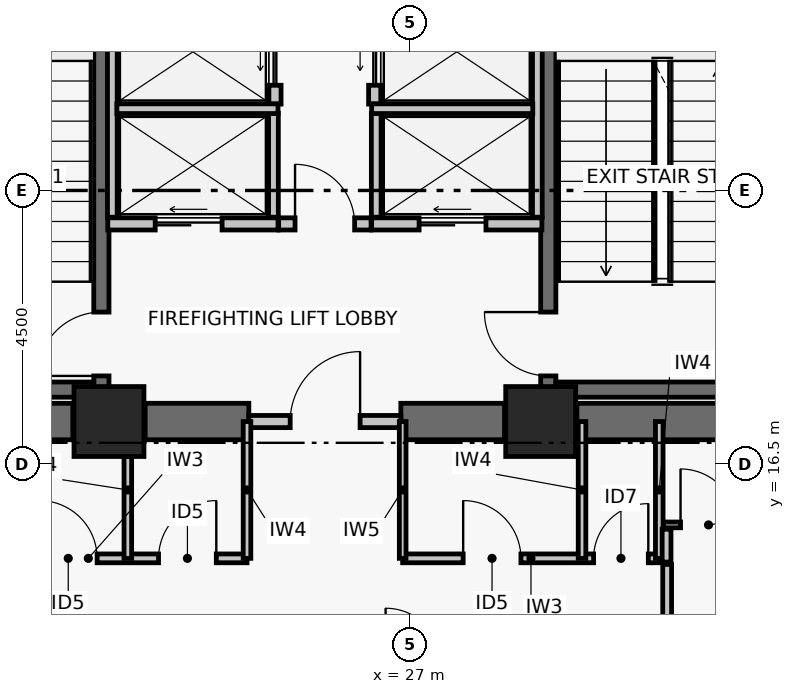
"""IFC4 building model, lengths in metres.
Left out: names, types, materials, properties, quantities, classifications, styles, units other than length and angle.
Written with IfcOpenShell. Run it as: python <this file> out.ifc"""

import sys

from ifc_helpers import new_model, si_unit, direction, frame, frame_2d, origin, origin_2d, place, context, subcontext, project, spatial, rectangle, extrude, element, fill, save


model = new_model("IFC4")
c1 = context("Model", 3, precision=1e-05, world=origin(), true_north=direction((0.0, 1.0)))
c2 = subcontext(c1, "Body", "Model", "MODEL_VIEW")
j1 = project(units=[si_unit("LENGTHUNIT", "METRE"), si_unit("PLANEANGLEUNIT", "RADIAN")], contexts=[c1])
p1 = place(None, origin())
s1 = spatial("IfcSite", under=j1, at=p1, CompositionType="ELEMENT")
p2 = place(p1, origin())
s2 = spatial("IfcBuilding", under=s1, at=p2, CompositionType="ELEMENT")
p3 = place(p2, frame((0.0, 0.0, 75.96)))
s3 = spatial("IfcBuildingStorey", under=s2, at=p3, CompositionType="ELEMENT", Elevation=75.96)
for number, where, z_axis, x_axis in (
    (1, (22.05, 17.2, 0.0), (0.0, 0.0, 1.0), (1.0, 0.0, 0.0)),
    (2, (29.15, 17.2, 0.0), (0.0, 0.0, 1.0), (1.0, 0.0, 0.0)),
):
    element("IfcColumn", number, at=place(p3, frame(where, z_axis=z_axis, x_axis=x_axis)), inside=s3, PredefinedType="COLUMN", context=c2, shape_type="SweptSolid", body=[
        extrude(rectangle(XDim=1.15, YDim=1.15, at=origin_2d()), origin(), (0.0, 0.0, 1.0), 3.72),
    ])
p4 = place(p3, frame((18.395, 17.2, 0.0), z_axis=(0.0, 0.0, 1.0), x_axis=(1.0, 0.0, 0.0)))
e3 = element("IfcWall", 3, at=p4, inside=s3, PredefinedType="SHEAR", context=c2, shape_type="SweptSolid", body=[
    extrude(rectangle(XDim=3.06, YDim=0.6, at=frame_2d((1.53, 0.0))), origin(), (0.0, 0.0, 1.0), 3.47),
])
p5 = place(p3, frame((22.645, 17.2, 0.0), z_axis=(0.0, 0.0, 1.0), x_axis=(1.0, 0.0, 0.0)))
e4 = element("IfcWall", 4, at=p5, inside=s3, PredefinedType="SHEAR", context=c2, shape_type="SweptSolid", body=[
    extrude(rectangle(XDim=1.705, YDim=0.6, at=frame_2d((0.853, 0.0))), origin(), (0.0, 0.0, 1.0), 3.47),
])
p6 = place(p3, frame((26.85, 17.2, 0.0), z_axis=(0.0, 0.0, 1.0), x_axis=(1.0, 0.0, 0.0)))
e5 = element("IfcWall", 5, at=p6, inside=s3, PredefinedType="SHEAR", context=c2, shape_type="SweptSolid", body=[
    extrude(rectangle(XDim=1.705, YDim=0.6, at=frame_2d((0.853, 0.0))), origin(), (0.0, 0.0, 1.0), 3.47),
])
p7 = place(p3, frame((29.745, 17.2, 0.0), z_axis=(0.0, 0.0, 1.0), x_axis=(1.0, 0.0, 0.0)))
e6 = element("IfcWall", 6, at=p7, inside=s3, PredefinedType="SHEAR", context=c2, shape_type="SweptSolid", body=[
    extrude(rectangle(XDim=3.06, YDim=0.6, at=frame_2d((1.53, 0.0))), origin(), (0.0, 0.0, 1.0), 3.47),
])
p8 = place(p3, frame((21.925, 17.6, 0.0), z_axis=(0.0, 0.0, 1.0), x_axis=(0.0, 1.0, 0.0)))
e7 = element("IfcWall", 7, at=p8, inside=s3, PredefinedType="SHEAR", context=c2, shape_type="SweptSolid", body=[
    extrude(rectangle(XDim=8.8, YDim=0.25, at=frame_2d((4.4, 0.0))), origin(), (0.0, 0.0, 1.0), 3.47),
])
p9 = place(p8, frame((0.35, 0.0, 0.0)))
e8 = element("IfcOpeningElement", 8, at=p9, cuts=e7, PredefinedType="OPENING", context=c2, shape_type="SweptSolid", body=[
    extrude(rectangle(XDim=1.05, YDim=2.08, at=frame_2d((0.525, 1.04))), frame((0.0, 0.135, 0.0), z_axis=(0.0, -1.0, 0.0), x_axis=(1.0, 0.0, 0.0)), (0.0, 0.0, 1.0), 0.27),
])
p10 = place(p3, frame((18.354, 17.725, 0.0), z_axis=(0.0, 0.0, 1.0), x_axis=(1.0, 0.0, 0.0)))
e9 = element("IfcWall", 9, at=p10, inside=s3, PredefinedType="SHEAR", context=c2, shape_type="SweptSolid", body=[
    extrude(rectangle(XDim=3.446, YDim=0.25, at=frame_2d((1.723, 0.0))), origin(), (0.0, 0.0, 1.0), 3.47),
])
p11 = place(p3, frame((29.275, 17.6, 0.0), z_axis=(0.0, 0.0, 1.0), x_axis=(0.0, 1.0, 0.0)))
e10 = element("IfcWall", 10, at=p11, inside=s3, PredefinedType="SHEAR", context=c2, shape_type="SweptSolid", body=[
    extrude(rectangle(XDim=8.8, YDim=0.25, at=frame_2d((4.4, 0.0))), origin(), (0.0, 0.0, 1.0), 3.47),
])
p12 = place(p11, frame((0.35, 0.0, 0.0)))
e11 = element("IfcOpeningElement", 11, at=p12, cuts=e10, PredefinedType="OPENING", context=c2, shape_type="SweptSolid", body=[
    extrude(rectangle(XDim=1.05, YDim=2.08, at=frame_2d((0.525, 1.04))), frame((0.0, 0.135, 0.0), z_axis=(0.0, -1.0, 0.0), x_axis=(1.0, 0.0, 0.0)), (0.0, 0.0, 1.0), 0.27),
])
p13 = place(p3, frame((29.4, 17.725, 0.0), z_axis=(0.0, 0.0, 1.0), x_axis=(1.0, 0.0, 0.0)))
e12 = element("IfcWall", 12, at=p13, inside=s3, PredefinedType="SHEAR", context=c2, shape_type="SweptSolid", body=[
    extrude(rectangle(XDim=3.446, YDim=0.25, at=frame_2d((1.723, 0.0))), origin(), (0.0, 0.0, 1.0), 3.47),
])
p14 = place(p3, frame((24.35, 17.2, 0.0), z_axis=(0.0, 0.0, 1.0), x_axis=(1.0, 0.0, 0.0)))
e13 = element("IfcWall", 13, at=p14, inside=s3, PredefinedType="PARTITIONING", context=c2, shape_type="SweptSolid", body=[
    extrude(rectangle(XDim=2.5, YDim=0.2, at=frame_2d((1.25, 0.0))), origin(), (0.0, 0.0, 1.0), 2.6),
])
p15 = place(p14, frame((0.68, 0.0, 0.0)))
e14 = element("IfcOpeningElement", 14, at=p15, cuts=e13, PredefinedType="OPENING", context=c2, shape_type="SweptSolid", body=[
    extrude(rectangle(XDim=1.15, YDim=2.08, at=frame_2d((0.575, 1.04))), frame((0.0, 0.11, 0.0), z_axis=(0.0, -1.0, 0.0), x_axis=(1.0, 0.0, 0.0)), (0.0, 0.0, 1.0), 0.22),
])
p16 = place(p3, frame((24.84, 20.45, 0.0), z_axis=(0.0, 0.0, 1.0), x_axis=(1.0, 0.0, 0.0)))
e15 = element("IfcWall", 15, at=p16, inside=s3, PredefinedType="PARTITIONING", context=c2, shape_type="SweptSolid", body=[
    extrude(rectangle(XDim=1.52, YDim=0.2, at=frame_2d((0.76, 0.0))), origin(), (0.0, 0.0, 1.0), 3.47),
])
p17 = place(p16, frame((0.27, 0.0, 0.0)))
e16 = element("IfcOpeningElement", 16, at=p17, cuts=e15, PredefinedType="OPENING", context=c2, shape_type="SweptSolid", body=[
    extrude(rectangle(XDim=0.98, YDim=2.06, at=frame_2d((0.49, 1.03))), frame((0.0, 0.11, 0.0), z_axis=(0.0, -1.0, 0.0), x_axis=(1.0, 0.0, 0.0)), (0.0, 0.0, 1.0), 0.22),
])
p18 = place(p3, frame((22.03, 20.45, 0.0), z_axis=(0.0, 0.0, 1.0), x_axis=(1.0, 0.0, 0.0)))
e17 = element("IfcWall", 17, at=p18, inside=s3, PredefinedType="PARTITIONING", context=c2, shape_type="SweptSolid", body=[
    extrude(rectangle(XDim=2.8, YDim=0.2, at=frame_2d((1.4, 0.0))), origin(), (0.0, 0.0, 1.0), 3.47),
])
p19 = place(p18, frame((0.78, 0.0, 0.0)))
e18 = element("IfcOpeningElement", 18, at=p19, cuts=e17, PredefinedType="OPENING", context=c2, shape_type="SweptSolid", body=[
    extrude(rectangle(XDim=1.1, YDim=2.08, at=frame_2d((0.55, 1.04))), frame((0.0, 0.11, 0.0), z_axis=(0.0, -1.0, 0.0), x_axis=(1.0, 0.0, 0.0)), (0.0, 0.0, 1.0), 0.22),
])
p20 = place(p3, frame((26.37, 20.45, 0.0), z_axis=(0.0, 0.0, 1.0), x_axis=(1.0, 0.0, 0.0)))
e19 = element("IfcWall", 19, at=p20, inside=s3, PredefinedType="PARTITIONING", context=c2, shape_type="SweptSolid", body=[
    extrude(rectangle(XDim=2.8, YDim=0.2, at=frame_2d((1.4, 0.0))), origin(), (0.0, 0.0, 1.0), 3.47),
])
p21 = place(p20, frame((0.78, 0.0, 0.0)))
e20 = element("IfcOpeningElement", 20, at=p21, cuts=e19, PredefinedType="OPENING", context=c2, shape_type="SweptSolid", body=[
    extrude(rectangle(XDim=1.1, YDim=2.08, at=frame_2d((0.55, 1.04))), frame((0.0, 0.11, 0.0), z_axis=(0.0, -1.0, 0.0), x_axis=(1.0, 0.0, 0.0)), (0.0, 0.0, 1.0), 0.22),
])
p22 = place(p3, frame((24.78, 22.42, 0.0), z_axis=(0.0, 0.0, 1.0), x_axis=(0.0, 1.0, 0.0)))
e21 = element("IfcWall", 21, at=p22, inside=s3, PredefinedType="PARTITIONING", context=c2, shape_type="SweptSolid", body=[
    extrude(rectangle(XDim=1.72, YDim=0.2, at=frame_2d((0.86, 0.0))), origin(), (0.0, 0.0, 1.0), 3.47),
])
p23 = place(p22, frame((0.31, 0.0, 0.0)))
e22 = element("IfcOpeningElement", 22, at=p23, cuts=e21, PredefinedType="OPENING", context=c2, shape_type="SweptSolid", body=[
    extrude(rectangle(XDim=1.1, YDim=2.08, at=frame_2d((0.55, 1.04))), frame((0.0, 0.11, 0.0), z_axis=(0.0, -1.0, 0.0), x_axis=(1.0, 0.0, 0.0)), (0.0, 0.0, 1.0), 0.22),
])
p24 = place(p3, frame((26.42, 22.42, 0.0), z_axis=(0.0, 0.0, 1.0), x_axis=(0.0, 1.0, 0.0)))
e23 = element("IfcWall", 23, at=p24, inside=s3, PredefinedType="PARTITIONING", context=c2, shape_type="SweptSolid", body=[
    extrude(rectangle(XDim=1.72, YDim=0.2, at=frame_2d((0.86, 0.0))), origin(), (0.0, 0.0, 1.0), 3.47),
])
p25 = place(p24, frame((0.31, 0.0, 0.0)))
e24 = element("IfcOpeningElement", 24, at=p25, cuts=e23, PredefinedType="OPENING", context=c2, shape_type="SweptSolid", body=[
    extrude(rectangle(XDim=1.1, YDim=2.08, at=frame_2d((0.55, 1.04))), frame((0.0, 0.11, 0.0), z_axis=(0.0, -1.0, 0.0), x_axis=(1.0, 0.0, 0.0)), (0.0, 0.0, 1.0), 0.22),
])
p26 = place(p3, frame((22.105, 20.56, 0.0), z_axis=(0.0, 0.0, 1.0), x_axis=(0.0, 1.0, 0.0)))
e25 = element("IfcWall", 25, at=p26, inside=s3, PredefinedType="PARTITIONING", context=c2, shape_type="SweptSolid", body=[
    extrude(rectangle(XDim=5.45, YDim=0.16, at=frame_2d((2.725, 0.0))), origin(), (0.0, 0.0, 1.0), 3.47),
])
p27 = place(p3, frame((24.755, 20.56, 0.0), z_axis=(0.0, 0.0, 1.0), x_axis=(0.0, 1.0, 0.0)))
e26 = element("IfcWall", 26, at=p27, inside=s3, PredefinedType="PARTITIONING", context=c2, shape_type="SweptSolid", body=[
    extrude(rectangle(XDim=1.71, YDim=0.16, at=frame_2d((0.855, 0.0))), origin(), (0.0, 0.0, 1.0), 3.47),
])
p28 = place(p3, frame((22.18, 22.345, 0.0), z_axis=(0.0, 0.0, 1.0), x_axis=(1.0, 0.0, 0.0)))
e27 = element("IfcWall", 27, at=p28, inside=s3, PredefinedType="PARTITIONING", context=c2, shape_type="SweptSolid", body=[
    extrude(rectangle(XDim=2.65, YDim=0.16, at=frame_2d((1.325, 0.0))), origin(), (0.0, 0.0, 1.0), 3.47),
])
p29 = place(p3, frame((29.095, 20.56, 0.0), z_axis=(0.0, 0.0, 1.0), x_axis=(0.0, 1.0, 0.0)))
e28 = element("IfcWall", 28, at=p29, inside=s3, PredefinedType="PARTITIONING", context=c2, shape_type="SweptSolid", body=[
    extrude(rectangle(XDim=5.45, YDim=0.16, at=frame_2d((2.725, 0.0))), origin(), (0.0, 0.0, 1.0), 3.47),
])
p30 = place(p3, frame((26.445, 20.56, 0.0), z_axis=(0.0, 0.0, 1.0), x_axis=(0.0, 1.0, 0.0)))
e29 = element("IfcWall", 29, at=p30, inside=s3, PredefinedType="PARTITIONING", context=c2, shape_type="SweptSolid", body=[
    extrude(rectangle(XDim=1.71, YDim=0.16, at=frame_2d((0.855, 0.0))), origin(), (0.0, 0.0, 1.0), 3.47),
])
p31 = place(p3, frame((26.37, 22.345, 0.0), z_axis=(0.0, 0.0, 1.0), x_axis=(1.0, 0.0, 0.0)))
e30 = element("IfcWall", 30, at=p31, inside=s3, PredefinedType="PARTITIONING", context=c2, shape_type="SweptSolid", body=[
    extrude(rectangle(XDim=2.65, YDim=0.16, at=frame_2d((1.325, 0.0))), origin(), (0.0, 0.0, 1.0), 3.47),
])
p32 = place(p3, frame((19.1, 14.95, 0.0), z_axis=(0.0, 0.0, 1.0), x_axis=(1.0, 0.0, 0.0)))
e31 = element("IfcWall", 31, at=p32, inside=s3, PredefinedType="PARTITIONING", context=c2, shape_type="SweptSolid", body=[
    extrude(rectangle(XDim=5.22, YDim=0.145, at=frame_2d((2.61, 0.0))), origin(), (0.0, 0.0, 1.0), 2.6),
])
p33 = place(p32, frame((0.2, 0.0, 0.0)))
e32 = element("IfcOpeningElement", 32, at=p33, cuts=e31, PredefinedType="OPENING", context=c2, shape_type="SweptSolid", body=[
    extrude(rectangle(XDim=0.9, YDim=2.02, at=frame_2d((0.45, 1.01))), frame((0.0, 0.083, 0.0), z_axis=(0.0, -1.0, 0.0), x_axis=(1.0, 0.0, 0.0)), (0.0, 0.0, 1.0), 0.165),
])
p34 = place(p32, frame((1.805, 0.0, 0.0)))
e33 = element("IfcOpeningElement", 33, at=p34, cuts=e31, PredefinedType="OPENING", context=c2, shape_type="SweptSolid", body=[
    extrude(rectangle(XDim=0.95, YDim=2.06, at=frame_2d((0.475, 1.03))), frame((0.0, 0.083, 0.0), z_axis=(0.0, -1.0, 0.0), x_axis=(1.0, 0.0, 0.0)), (0.0, 0.0, 1.0), 0.165),
])
p35 = place(p32, frame((3.765, 0.0, 0.0)))
e34 = element("IfcOpeningElement", 34, at=p35, cuts=e31, PredefinedType="OPENING", context=c2, shape_type="SweptSolid", body=[
    extrude(rectangle(XDim=0.95, YDim=2.06, at=frame_2d((0.475, 1.03))), frame((0.0, 0.083, 0.0), z_axis=(0.0, -1.0, 0.0), x_axis=(1.0, 0.0, 0.0)), (0.0, 0.0, 1.0), 0.165),
])
p36 = place(p3, frame((26.88, 14.95, 0.0), z_axis=(0.0, 0.0, 1.0), x_axis=(1.0, 0.0, 0.0)))
e35 = element("IfcWall", 35, at=p36, inside=s3, PredefinedType="PARTITIONING", context=c2, shape_type="SweptSolid", body=[
    extrude(rectangle(XDim=4.22, YDim=0.145, at=frame_2d((2.11, 0.0))), origin(), (0.0, 0.0, 1.0), 3.0),
])
p37 = place(p36, frame((0.995, 0.0, 0.0)))
e36 = element("IfcOpeningElement", 36, at=p37, cuts=e35, PredefinedType="OPENING", context=c2, shape_type="SweptSolid", body=[
    extrude(rectangle(XDim=0.95, YDim=2.06, at=frame_2d((0.475, 1.03))), frame((0.0, 0.083, 0.0), z_axis=(0.0, -1.0, 0.0), x_axis=(1.0, 0.0, 0.0)), (0.0, 0.0, 1.0), 0.165),
])
p38 = place(p36, frame((3.14, 0.0, 0.0)))
e37 = element("IfcOpeningElement", 37, at=p38, cuts=e35, PredefinedType="OPENING", context=c2, shape_type="SweptSolid", body=[
    extrude(rectangle(XDim=0.9, YDim=2.02, at=frame_2d((0.45, 1.01))), frame((0.0, 0.083, 0.0), z_axis=(0.0, -1.0, 0.0), x_axis=(1.0, 0.0, 0.0)), (0.0, 0.0, 1.0), 0.165),
])
for number, where, z_axis, x_axis in (
    (38, (22.36, 14.95, 0.0), (0.0, 0.0, 1.0), (0.0, 1.0, 0.0)),
    (39, (24.32, 14.95, 0.0), (0.0, 0.0, 1.0), (0.0, 1.0, 0.0)),
):
    element("IfcWall", number, at=place(p3, frame(where, z_axis=z_axis, x_axis=x_axis)), inside=s3, PredefinedType="PARTITIONING", context=c2, shape_type="SweptSolid", body=[
        extrude(rectangle(XDim=2.25, YDim=0.125, at=frame_2d((1.125, 0.0))), origin(), (0.0, 0.0, 1.0), 2.6),
    ])
p39 = place(p3, frame((26.88, 14.95, 0.0), z_axis=(0.0, 0.0, 1.0), x_axis=(0.0, 1.0, 0.0)))
e40 = element("IfcWall", 40, at=p39, inside=s3, PredefinedType="PARTITIONING", context=c2, shape_type="SweptSolid", body=[
    extrude(rectangle(XDim=2.25, YDim=0.11, at=frame_2d((1.125, 0.0))), origin(), (0.0, 0.0, 1.0), 2.6),
])
for number, where, z_axis, x_axis in (
    (41, (29.83, 14.95, 0.0), (0.0, 0.0, 1.0), (0.0, 1.0, 0.0)),
    (42, (31.1, 14.95, 0.0), (0.0, 0.0, 1.0), (0.0, 1.0, 0.0)),
):
    element("IfcWall", number, at=place(p3, frame(where, z_axis=z_axis, x_axis=x_axis)), inside=s3, PredefinedType="PARTITIONING", context=c2, shape_type="SweptSolid", body=[
        extrude(rectangle(XDim=2.25, YDim=0.125, at=frame_2d((1.125, 0.0))), origin(), (0.0, 0.0, 1.0), 2.6),
    ])
p40 = place(p3, frame((31.23, 13.351, 0.0), z_axis=(0.0, 0.0, 1.0), x_axis=(0.0, 1.0, 0.0)))
e43 = element("IfcWall", 43, at=p40, inside=s3, PredefinedType="PARTITIONING", context=c2, shape_type="SweptSolid", body=[
    extrude(rectangle(XDim=1.499, YDim=0.145, at=frame_2d((0.75, 0.0))), origin(), (0.0, 0.0, 1.0), 2.85),
])
p41 = place(p3, frame((31.22, 14.889, 0.0), z_axis=(0.0, 0.0, 1.0), x_axis=(0.0, 1.0, 0.0)))
e44 = element("IfcWall", 44, at=p41, inside=s3, PredefinedType="PARTITIONING", context=c2, shape_type="SweptSolid", body=[
    extrude(rectangle(XDim=0.541, YDim=0.145, at=frame_2d((0.271, 0.0))), origin(), (0.0, 0.0, 1.0), 3.0),
])
p42 = place(p3, frame((31.17, 15.5, 0.0), z_axis=(0.0, 0.0, 1.0), x_axis=(1.0, 0.0, 0.0)))
e45 = element("IfcWall", 45, at=p42, inside=s3, PredefinedType="PARTITIONING", context=c2, shape_type="SweptSolid", body=[
    extrude(rectangle(XDim=4.354, YDim=0.095, at=frame_2d((2.177, 0.0))), origin(), (0.0, 0.0, 1.0), 2.85),
])
p43 = place(p42, frame((0.28, 0.0, 0.0)))
e46 = element("IfcOpeningElement", 46, at=p43, cuts=e45, PredefinedType="OPENING", context=c2, shape_type="SweptSolid", body=[
    extrude(rectangle(XDim=0.92, YDim=2.05, at=frame_2d((0.46, 1.025))), frame((0.0, 0.057, 0.0), z_axis=(0.0, -1.0, 0.0), x_axis=(1.0, 0.0, 0.0)), (0.0, 0.0, 1.0), 0.115),
])
p44 = place(p9, origin())
e47 = element("IfcDoor", 47, at=p44, inside=s3, OperationType="SINGLE_SWING_LEFT", PredefinedType="DOOR", context=c2, shape_type="SweptSolid", body=[
    extrude(rectangle(XDim=1.05, YDim=2.08, at=frame_2d((0.525, 1.04))), frame((0.0, 0.025, 0.0), z_axis=(0.0, -1.0, 0.0), x_axis=(1.0, 0.0, 0.0)), (0.0, 0.0, 1.0), 0.05),
])
fill(e8, e47)
p45 = place(p12, origin())
e48 = element("IfcDoor", 48, at=p45, inside=s3, OperationType="SINGLE_SWING_RIGHT", PredefinedType="DOOR", context=c2, shape_type="SweptSolid", body=[
    extrude(rectangle(XDim=1.05, YDim=2.08, at=frame_2d((0.525, 1.04))), frame((0.0, 0.025, 0.0), z_axis=(0.0, -1.0, 0.0), x_axis=(1.0, 0.0, 0.0)), (0.0, 0.0, 1.0), 0.05),
])
fill(e11, e48)
p46 = place(p15, origin())
e49 = element("IfcDoor", 49, at=p46, inside=s3, OperationType="SINGLE_SWING_RIGHT", PredefinedType="DOOR", context=c2, shape_type="SweptSolid", body=[
    extrude(rectangle(XDim=1.15, YDim=2.08, at=frame_2d((0.575, 1.04))), frame((0.0, 0.025, 0.0), z_axis=(0.0, -1.0, 0.0), x_axis=(1.0, 0.0, 0.0)), (0.0, 0.0, 1.0), 0.05),
])
fill(e14, e49)
p47 = place(p17, origin())
e50 = element("IfcDoor", 50, at=p47, inside=s3, OperationType="SINGLE_SWING_LEFT", PredefinedType="DOOR", context=c2, shape_type="SweptSolid", body=[
    extrude(rectangle(XDim=0.98, YDim=2.06, at=frame_2d((0.49, 1.03))), frame((0.0, 0.025, 0.0), z_axis=(0.0, -1.0, 0.0), x_axis=(1.0, 0.0, 0.0)), (0.0, 0.0, 1.0), 0.05),
])
fill(e16, e50)
p48 = place(p19, origin())
e51 = element("IfcDoor", 51, at=p48, inside=s3, OperationType="DOUBLE_DOOR_SLIDING", PredefinedType="DOOR", context=c2, shape_type="SweptSolid", body=[
    extrude(rectangle(XDim=1.1, YDim=2.08, at=frame_2d((0.55, 1.04))), frame((0.0, 0.025, 0.0), z_axis=(0.0, -1.0, 0.0), x_axis=(1.0, 0.0, 0.0)), (0.0, 0.0, 1.0), 0.05),
])
fill(e18, e51)
p49 = place(p21, origin())
e52 = element("IfcDoor", 52, at=p49, inside=s3, OperationType="DOUBLE_DOOR_SLIDING", PredefinedType="DOOR", context=c2, shape_type="SweptSolid", body=[
    extrude(rectangle(XDim=1.1, YDim=2.08, at=frame_2d((0.55, 1.04))), frame((0.0, 0.025, 0.0), z_axis=(0.0, -1.0, 0.0), x_axis=(1.0, 0.0, 0.0)), (0.0, 0.0, 1.0), 0.05),
])
fill(e20, e52)
p50 = place(p23, origin())
e53 = element("IfcDoor", 53, at=p50, inside=s3, OperationType="DOUBLE_DOOR_SLIDING", PredefinedType="DOOR", context=c2, shape_type="SweptSolid", body=[
    extrude(rectangle(XDim=1.1, YDim=2.08, at=frame_2d((0.55, 1.04))), frame((0.0, 0.025, 0.0), z_axis=(0.0, -1.0, 0.0), x_axis=(1.0, 0.0, 0.0)), (0.0, 0.0, 1.0), 0.05),
])
fill(e22, e53)
p51 = place(p25, origin())
e54 = element("IfcDoor", 54, at=p51, inside=s3, OperationType="DOUBLE_DOOR_SLIDING", PredefinedType="DOOR", context=c2, shape_type="SweptSolid", body=[
    extrude(rectangle(XDim=1.1, YDim=2.08, at=frame_2d((0.55, 1.04))), frame((0.0, 0.025, 0.0), z_axis=(0.0, -1.0, 0.0), x_axis=(1.0, 0.0, 0.0)), (0.0, 0.0, 1.0), 0.05),
])
fill(e24, e54)
p52 = place(p34, origin())
e55 = element("IfcDoor", 55, at=p52, inside=s3, OperationType="SINGLE_SWING_LEFT", PredefinedType="DOOR", context=c2, shape_type="SweptSolid", body=[
    extrude(rectangle(XDim=0.95, YDim=2.06, at=frame_2d((0.475, 1.03))), frame((0.0, 0.025, 0.0), z_axis=(0.0, -1.0, 0.0), x_axis=(1.0, 0.0, 0.0)), (0.0, 0.0, 1.0), 0.05),
])
fill(e33, e55)
p53 = place(p35, origin())
e56 = element("IfcDoor", 56, at=p53, inside=s3, OperationType="SINGLE_SWING_RIGHT", PredefinedType="DOOR", context=c2, shape_type="SweptSolid", body=[
    extrude(rectangle(XDim=0.95, YDim=2.06, at=frame_2d((0.475, 1.03))), frame((0.0, 0.025, 0.0), z_axis=(0.0, -1.0, 0.0), x_axis=(1.0, 0.0, 0.0)), (0.0, 0.0, 1.0), 0.05),
])
fill(e34, e56)
p54 = place(p37, origin())
e57 = element("IfcDoor", 57, at=p54, inside=s3, OperationType="SINGLE_SWING_LEFT", PredefinedType="DOOR", context=c2, shape_type="SweptSolid", body=[
    extrude(rectangle(XDim=0.95, YDim=2.06, at=frame_2d((0.475, 1.03))), frame((0.0, 0.025, 0.0), z_axis=(0.0, -1.0, 0.0), x_axis=(1.0, 0.0, 0.0)), (0.0, 0.0, 1.0), 0.05),
])
fill(e36, e57)
p55 = place(p38, origin())
e58 = element("IfcDoor", 58, at=p55, inside=s3, OperationType="SINGLE_SWING_RIGHT", PredefinedType="DOOR", context=c2, shape_type="SweptSolid", body=[
    extrude(rectangle(XDim=0.9, YDim=2.02, at=frame_2d((0.45, 1.01))), frame((0.0, 0.025, 0.0), z_axis=(0.0, -1.0, 0.0), x_axis=(1.0, 0.0, 0.0)), (0.0, 0.0, 1.0), 0.05),
])
fill(e37, e58)
p56 = place(p43, origin())
e59 = element("IfcDoor", 59, at=p56, inside=s3, OperationType="SINGLE_SWING_LEFT", PredefinedType="DOOR", context=c2, shape_type="SweptSolid", body=[
    extrude(rectangle(XDim=0.92, YDim=2.05, at=frame_2d((0.46, 1.025))), frame((0.0, 0.025, 0.0), z_axis=(0.0, -1.0, 0.0), x_axis=(1.0, 0.0, 0.0)), (0.0, 0.0, 1.0), 0.05),
])
fill(e46, e59)
save(model, sys.argv[1])
